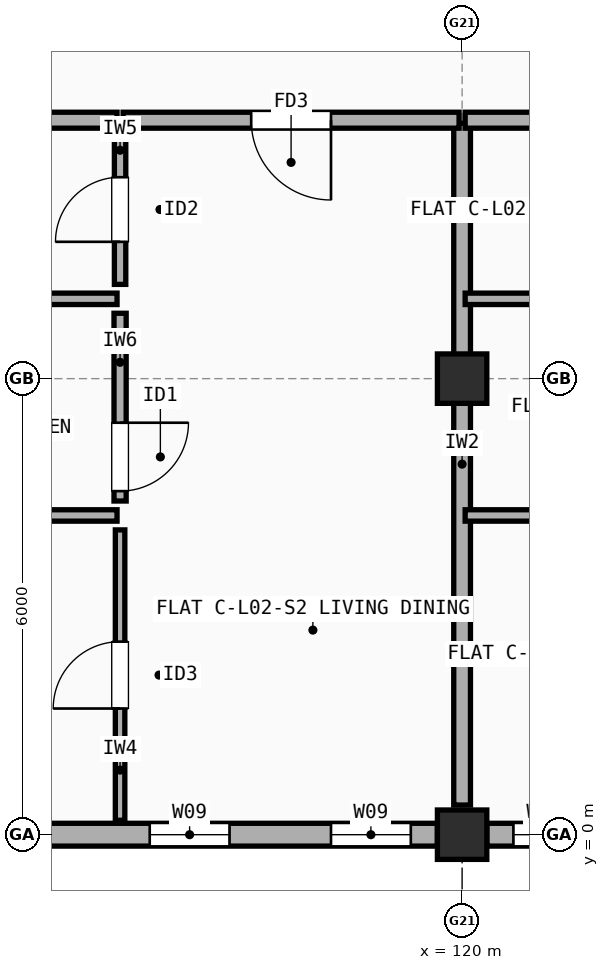
"""IFC4 building model, lengths in metres.
Left out: names, types, materials, properties, quantities, classifications, styles, units other than length and angle.
Written with IfcOpenShell. Run it as: python <this file> out.ifc"""

import sys

from ifc_helpers import new_model, si_unit, direction, frame, frame_2d, origin, origin_2d, place, context, subcontext, project, spatial, rectangle, extrude, element, fill, save


model = new_model("IFC4")
c1 = context("Model", 3, precision=1e-05, world=origin(), true_north=direction((0.0, 1.0)))
c2 = subcontext(c1, "Body", "Model", "MODEL_VIEW")
j1 = project(units=[si_unit("LENGTHUNIT", "METRE"), si_unit("PLANEANGLEUNIT", "RADIAN")], contexts=[c1])
p1 = place(None, origin())
s1 = spatial("IfcSite", under=j1, at=p1, CompositionType="ELEMENT")
p2 = place(p1, origin())
s2 = spatial("IfcBuilding", under=s1, at=p2, CompositionType="ELEMENT")
p3 = place(p2, frame((0.0, 0.0, 7.7)))
s3 = spatial("IfcBuildingStorey", under=s2, at=p3, CompositionType="ELEMENT", Elevation=7.7)
for number, where, z_axis, x_axis in (
    (1, (120.0, 0.0, 0.0), (0.0, 0.0, 1.0), (1.0, 0.0, 0.0)),
    (2, (120.0, 6.0, 0.0), (0.0, 0.0, 1.0), (1.0, 0.0, 0.0)),
):
    element("IfcColumn", number, at=place(p3, frame(where, z_axis=z_axis, x_axis=x_axis)), inside=s3, PredefinedType="COLUMN", context=c2, shape_type="SweptSolid", body=[
        extrude(rectangle(XDim=0.65, YDim=0.65, at=origin_2d()), origin(), (0.0, 0.0, 1.0), 2.955),
    ])
p4 = place(p3, frame((114.325, 0.0, 0.0), z_axis=(0.0, 0.0, 1.0), x_axis=(1.0, 0.0, 0.0)))
e3 = element("IfcWall", 3, at=p4, inside=s3, PredefinedType="STANDARD", context=c2, shape_type="SweptSolid", body=[
    extrude(rectangle(XDim=5.35, YDim=0.3, at=frame_2d((2.675, 0.0))), origin(), (0.0, 0.0, 1.0), 2.437),
])
p5 = place(p4, frame((1.565, 0.0, 0.9)))
e4 = element("IfcOpeningElement", 4, at=p5, cuts=e3, PredefinedType="OPENING", context=c2, shape_type="SweptSolid", body=[
    extrude(rectangle(XDim=1.05, YDim=1.35, at=frame_2d((0.525, 0.675))), frame((0.0, 0.16, 0.0), z_axis=(0.0, -1.0, 0.0), x_axis=(1.0, 0.0, 0.0)), (0.0, 0.0, 1.0), 0.32),
])
p6 = place(p4, frame((3.95, 0.0, 0.9)))
e5 = element("IfcOpeningElement", 5, at=p6, cuts=e3, PredefinedType="OPENING", context=c2, shape_type="SweptSolid", body=[
    extrude(rectangle(XDim=1.05, YDim=1.35, at=frame_2d((0.525, 0.675))), frame((0.0, 0.16, 0.0), z_axis=(0.0, -1.0, 0.0), x_axis=(1.0, 0.0, 0.0)), (0.0, 0.0, 1.0), 0.32),
])
p7 = place(p3, frame((120.325, 0.0, 0.0), z_axis=(0.0, 0.0, 1.0), x_axis=(1.0, 0.0, 0.0)))
e6 = element("IfcWall", 6, at=p7, inside=s3, PredefinedType="STANDARD", context=c2, shape_type="SweptSolid", body=[
    extrude(rectangle(XDim=5.35, YDim=0.3, at=frame_2d((2.675, 0.0))), origin(), (0.0, 0.0, 1.0), 2.437),
])
p8 = place(p7, frame((0.35, 0.0, 0.9)))
e7 = element("IfcOpeningElement", 7, at=p8, cuts=e6, PredefinedType="OPENING", context=c2, shape_type="SweptSolid", body=[
    extrude(rectangle(XDim=0.8, YDim=1.2, at=frame_2d((0.4, 0.6))), frame((0.0, 0.16, 0.0), z_axis=(0.0, -1.0, 0.0), x_axis=(1.0, 0.0, 0.0)), (0.0, 0.0, 1.0), 0.32),
])
p9 = place(p7, frame((2.985, 0.0, 0.9)))
e8 = element("IfcOpeningElement", 8, at=p9, cuts=e6, PredefinedType="OPENING", context=c2, shape_type="SweptSolid", body=[
    extrude(rectangle(XDim=0.8, YDim=1.2, at=frame_2d((0.4, 0.6))), frame((0.0, 0.16, 0.0), z_axis=(0.0, -1.0, 0.0), x_axis=(1.0, 0.0, 0.0)), (0.0, 0.0, 1.0), 0.32),
])
p10 = place(p3, frame((120.0, 0.39, 0.0), z_axis=(0.0, 0.0, 1.0), x_axis=(0.0, 1.0, 0.0)))
e9 = element("IfcWall", 9, at=p10, inside=s3, PredefinedType="SOLIDWALL", context=c2, shape_type="SweptSolid", body=[
    extrude(rectangle(XDim=8.97, YDim=0.22, at=frame_2d((4.485, 0.0))), origin(), (0.0, 0.0, 1.0), 2.337),
])
p11 = place(p3, frame((111.04, 9.4, 0.0), z_axis=(0.0, 0.0, 1.0), x_axis=(1.0, 0.0, 0.0)))
e10 = element("IfcWall", 10, at=p11, inside=s3, PredefinedType="SOLIDWALL", context=c2, shape_type="SweptSolid", body=[
    extrude(rectangle(XDim=4.42, YDim=0.21, at=frame_2d((2.21, 0.0))), origin(), (0.0, 0.0, 1.0), 2.337),
])
p12 = place(p3, frame((115.54, 9.4, 0.0), z_axis=(0.0, 0.0, 1.0), x_axis=(1.0, 0.0, 0.0)))
e11 = element("IfcWall", 11, at=p12, inside=s3, PredefinedType="SOLIDWALL", context=c2, shape_type="SweptSolid", body=[
    extrude(rectangle(XDim=4.42, YDim=0.21, at=frame_2d((2.21, 0.0))), origin(), (0.0, 0.0, 1.0), 2.337),
])
p13 = place(p12, frame((1.685, 0.0, 0.0)))
e12 = element("IfcOpeningElement", 12, at=p13, cuts=e11, PredefinedType="OPENING", context=c2, shape_type="SweptSolid", body=[
    extrude(rectangle(XDim=1.05, YDim=2.15, at=frame_2d((0.525, 1.075))), frame((0.0, 0.115, 0.0), z_axis=(0.0, -1.0, 0.0), x_axis=(1.0, 0.0, 0.0)), (0.0, 0.0, 1.0), 0.23),
])
p14 = place(p3, frame((115.5, 0.19, 0.0), z_axis=(0.0, 0.0, 1.0), x_axis=(0.0, 1.0, 0.0)))
e13 = element("IfcWall", 13, at=p14, inside=s3, PredefinedType="PARTITIONING", context=c2, shape_type="SweptSolid", body=[
    extrude(rectangle(XDim=3.82, YDim=0.125, at=frame_2d((1.91, 0.0))), origin(), (0.0, 0.0, 1.0), 2.955),
])
p15 = place(p14, frame((1.47, 0.0, 0.0)))
e14 = element("IfcOpeningElement", 14, at=p15, cuts=e13, PredefinedType="OPENING", context=c2, shape_type="SweptSolid", body=[
    extrude(rectangle(XDim=0.88, YDim=2.1, at=frame_2d((0.44, 1.05))), frame((0.0, 0.073, 0.0), z_axis=(0.0, -1.0, 0.0), x_axis=(1.0, 0.0, 0.0)), (0.0, 0.0, 1.0), 0.145),
])
p16 = place(p3, frame((115.5, 4.39, 0.0), z_axis=(0.0, 0.0, 1.0), x_axis=(0.0, 1.0, 0.0)))
e15 = element("IfcWall", 15, at=p16, inside=s3, PredefinedType="PLUMBINGWALL", context=c2, shape_type="SweptSolid", body=[
    extrude(rectangle(XDim=2.47, YDim=0.16, at=frame_2d((1.235, 0.0))), origin(), (0.0, 0.0, 1.0), 2.437),
])
p17 = place(p16, frame((0.13, 0.0, 0.0)))
e16 = element("IfcOpeningElement", 16, at=p17, cuts=e15, PredefinedType="OPENING", context=c2, shape_type="SweptSolid", body=[
    extrude(rectangle(XDim=0.9, YDim=2.1, at=frame_2d((0.45, 1.05))), frame((0.0, 0.09, 0.0), z_axis=(0.0, -1.0, 0.0), x_axis=(1.0, 0.0, 0.0)), (0.0, 0.0, 1.0), 0.18),
])
p18 = place(p3, frame((115.5, 7.24, 0.0), z_axis=(0.0, 0.0, 1.0), x_axis=(0.0, 1.0, 0.0)))
e17 = element("IfcWall", 17, at=p18, inside=s3, PredefinedType="PARTITIONING", context=c2, shape_type="SweptSolid", body=[
    extrude(rectangle(XDim=1.97, YDim=0.15, at=frame_2d((0.985, 0.0))), origin(), (0.0, 0.0, 1.0), 2.955),
])
p19 = place(p18, frame((0.56, 0.0, 0.0)))
e18 = element("IfcOpeningElement", 18, at=p19, cuts=e17, PredefinedType="OPENING", context=c2, shape_type="SweptSolid", body=[
    extrude(rectangle(XDim=0.85, YDim=2.1, at=frame_2d((0.425, 1.05))), frame((0.0, 0.085, 0.0), z_axis=(0.0, -1.0, 0.0), x_axis=(1.0, 0.0, 0.0)), (0.0, 0.0, 1.0), 0.17),
])
for number, where, z_axis, x_axis in (
    (19, (111.04, 4.2, 0.0), (0.0, 0.0, 1.0), (1.0, 0.0, 0.0)),
    (20, (111.04, 7.05, 0.0), (0.0, 0.0, 1.0), (1.0, 0.0, 0.0)),
):
    element("IfcWall", number, at=place(p3, frame(where, z_axis=z_axis, x_axis=x_axis)), inside=s3, PredefinedType="PARTITIONING", context=c2, shape_type="SweptSolid", body=[
        extrude(rectangle(XDim=4.42, YDim=0.15, at=frame_2d((2.21, 0.0))), origin(), (0.0, 0.0, 1.0), 2.337),
    ])
p20 = place(p3, frame((120.04, 9.4, 0.0), z_axis=(0.0, 0.0, 1.0), x_axis=(1.0, 0.0, 0.0)))
e21 = element("IfcWall", 21, at=p20, inside=s3, PredefinedType="SOLIDWALL", context=c2, shape_type="SweptSolid", body=[
    extrude(rectangle(XDim=4.42, YDim=0.21, at=frame_2d((2.21, 0.0))), origin(), (0.0, 0.0, 1.0), 2.337),
])
for number, where, z_axis, x_axis in (
    (22, (120.04, 4.2, 0.0), (0.0, 0.0, 1.0), (1.0, 0.0, 0.0)),
    (23, (120.04, 7.05, 0.0), (0.0, 0.0, 1.0), (1.0, 0.0, 0.0)),
):
    element("IfcWall", number, at=place(p3, frame(where, z_axis=z_axis, x_axis=x_axis)), inside=s3, PredefinedType="PARTITIONING", context=c2, shape_type="SweptSolid", body=[
        extrude(rectangle(XDim=4.42, YDim=0.15, at=frame_2d((2.21, 0.0))), origin(), (0.0, 0.0, 1.0), 2.337),
    ])
p21 = place(p5, origin())
e24 = element("IfcWindow", 24, at=p21, inside=s3, PartitioningType="SINGLE_PANEL", PredefinedType="WINDOW", context=c2, shape_type="SweptSolid", body=[
    extrude(rectangle(XDim=1.05, YDim=1.35, at=frame_2d((0.525, 0.675))), frame((0.0, 0.03, 0.0), z_axis=(0.0, -1.0, 0.0), x_axis=(1.0, 0.0, 0.0)), (0.0, 0.0, 1.0), 0.06),
])
fill(e4, e24)
p22 = place(p6, origin())
e25 = element("IfcWindow", 25, at=p22, inside=s3, PartitioningType="SINGLE_PANEL", PredefinedType="WINDOW", context=c2, shape_type="SweptSolid", body=[
    extrude(rectangle(XDim=1.05, YDim=1.35, at=frame_2d((0.525, 0.675))), frame((0.0, 0.03, 0.0), z_axis=(0.0, -1.0, 0.0), x_axis=(1.0, 0.0, 0.0)), (0.0, 0.0, 1.0), 0.06),
])
fill(e5, e25)
p23 = place(p8, origin())
e26 = element("IfcWindow", 26, at=p23, inside=s3, PartitioningType="SINGLE_PANEL", PredefinedType="WINDOW", context=c2, shape_type="SweptSolid", body=[
    extrude(rectangle(XDim=0.8, YDim=1.2, at=frame_2d((0.4, 0.6))), frame((0.0, 0.03, 0.0), z_axis=(0.0, -1.0, 0.0), x_axis=(1.0, 0.0, 0.0)), (0.0, 0.0, 1.0), 0.06),
])
fill(e7, e26)
p24 = place(p13, origin())
e27 = element("IfcDoor", 27, at=p24, inside=s3, OperationType="SINGLE_SWING_RIGHT", PredefinedType="DOOR", context=c2, shape_type="SweptSolid", body=[
    extrude(rectangle(XDim=1.05, YDim=2.15, at=frame_2d((0.525, 1.075))), frame((0.0, 0.025, 0.0), z_axis=(0.0, -1.0, 0.0), x_axis=(1.0, 0.0, 0.0)), (0.0, 0.0, 1.0), 0.05),
])
fill(e12, e27)
p25 = place(p15, origin())
e28 = element("IfcDoor", 28, at=p25, inside=s3, OperationType="SINGLE_SWING_LEFT", PredefinedType="DOOR", context=c2, shape_type="SweptSolid", body=[
    extrude(rectangle(XDim=0.88, YDim=2.1, at=frame_2d((0.44, 1.05))), frame((0.0, 0.025, 0.0), z_axis=(0.0, -1.0, 0.0), x_axis=(1.0, 0.0, 0.0)), (0.0, 0.0, 1.0), 0.05),
])
fill(e14, e28)
p26 = place(p17, origin())
e29 = element("IfcDoor", 29, at=p26, inside=s3, OperationType="SINGLE_SWING_RIGHT", PredefinedType="DOOR", context=c2, shape_type="SweptSolid", body=[
    extrude(rectangle(XDim=0.9, YDim=2.1, at=frame_2d((0.45, 1.05))), frame((0.0, 0.025, 0.0), z_axis=(0.0, -1.0, 0.0), x_axis=(1.0, 0.0, 0.0)), (0.0, 0.0, 1.0), 0.05),
])
fill(e16, e29)
p27 = place(p19, origin())
e30 = element("IfcDoor", 30, at=p27, inside=s3, OperationType="SINGLE_SWING_LEFT", PredefinedType="DOOR", context=c2, shape_type="SweptSolid", body=[
    extrude(rectangle(XDim=0.85, YDim=2.1, at=frame_2d((0.425, 1.05))), frame((0.0, 0.025, 0.0), z_axis=(0.0, -1.0, 0.0), x_axis=(1.0, 0.0, 0.0)), (0.0, 0.0, 1.0), 0.05),
])
fill(e18, e30)
save(model, sys.argv[1])
